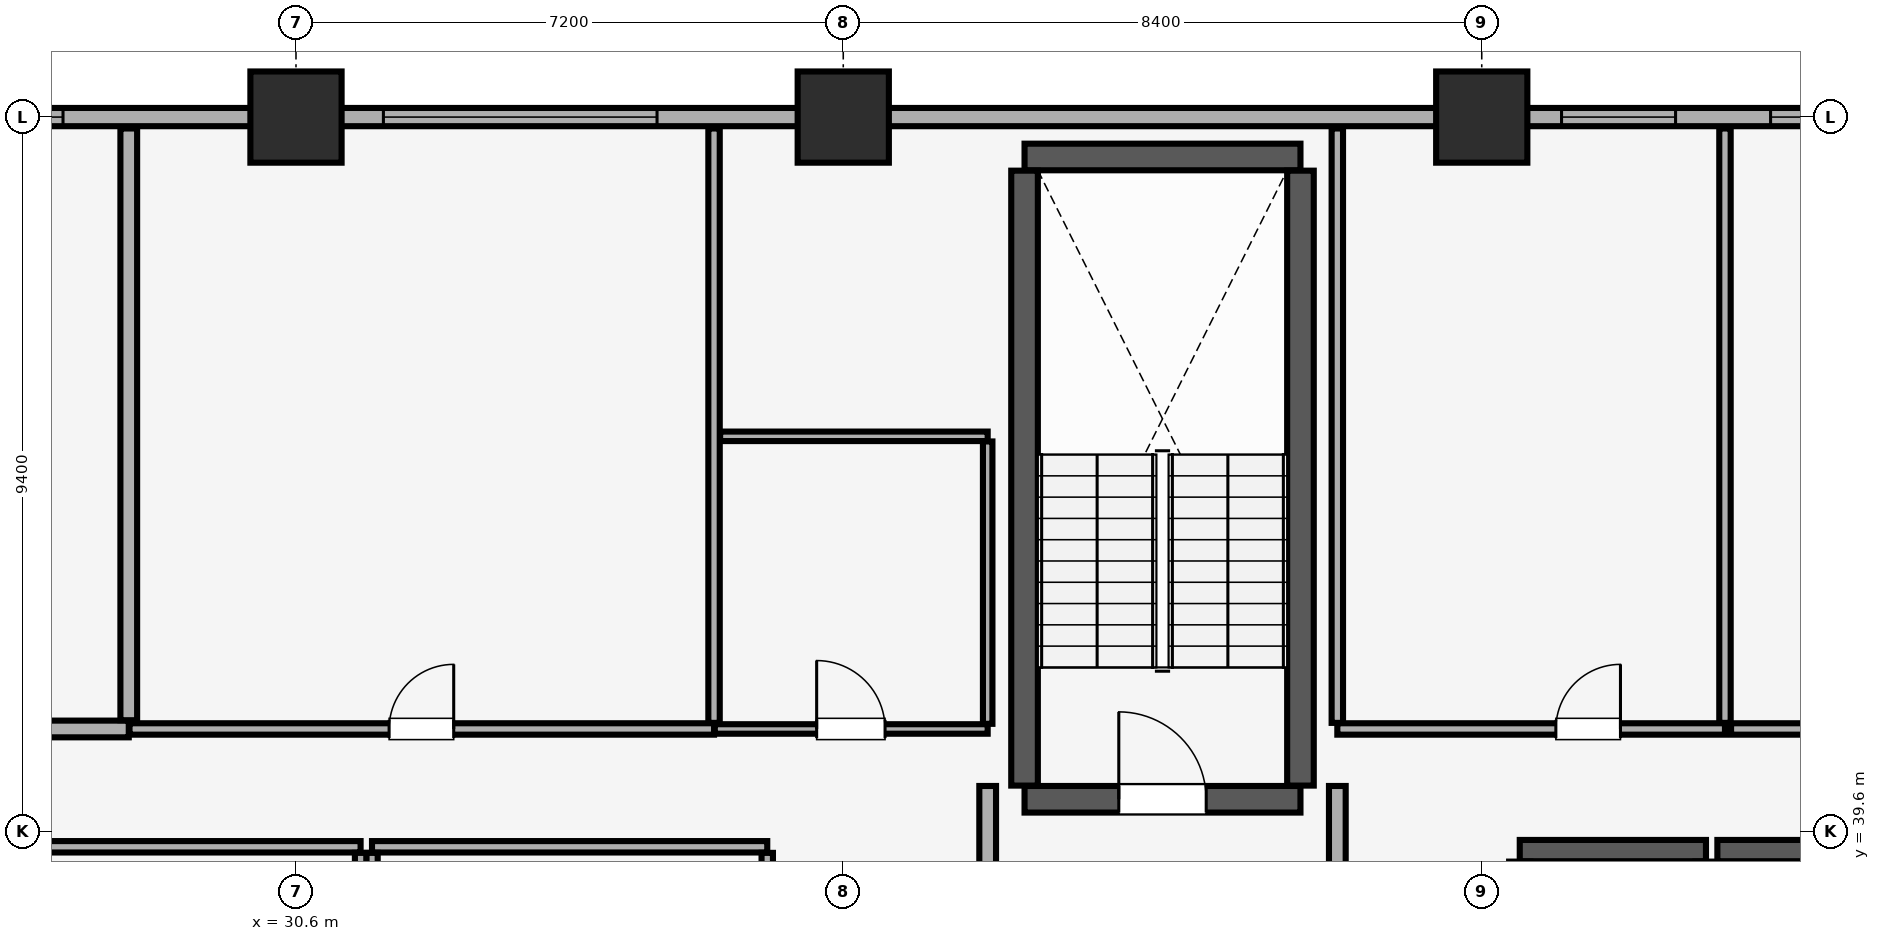
"""IFC4 building model, lengths in metres.
Left out: names, types, materials, properties, quantities, classifications, styles, units other than length and angle.
Written with IfcOpenShell. Run it as: python <this file> out.ifc"""

import sys

from ifc_helpers import new_model, si_unit, direction, frame, frame_2d, origin, origin_2d, place, context, subcontext, project, spatial, rectangle, extrude, element, fill, save


model = new_model("IFC4")
c1 = context("Model", 3, precision=1e-05, world=origin(), true_north=direction((0.0, 1.0)))
c2 = subcontext(c1, "Body", "Model", "MODEL_VIEW")
j1 = project(units=[si_unit("LENGTHUNIT", "METRE"), si_unit("PLANEANGLEUNIT", "RADIAN")], contexts=[c1])
p1 = place(None, origin())
s1 = spatial("IfcSite", under=j1, at=p1, CompositionType="ELEMENT")
p2 = place(p1, origin())
s2 = spatial("IfcBuilding", under=s1, at=p2, CompositionType="ELEMENT")
p3 = place(p2, frame((0.0, 0.0, 220.55)))
s3 = spatial("IfcBuildingStorey", under=s2, at=p3, CompositionType="ELEMENT", Elevation=220.55)
for number, where, z_axis, x_axis in (
    (1, (30.6, 49.0, 0.0), (0.0, 0.0, 1.0), (1.0, 0.0, 0.0)),
    (2, (37.8, 49.0, 0.0), (0.0, 0.0, 1.0), (1.0, 0.0, 0.0)),
    (3, (46.2, 49.0, 0.0), (0.0, 0.0, 1.0), (1.0, 0.0, 0.0)),
):
    element("IfcColumn", number, at=place(p3, frame(where, z_axis=z_axis, x_axis=x_axis)), inside=s3, PredefinedType="COLUMN", context=c2, shape_type="SweptSolid", body=[
        extrude(rectangle(XDim=1.2, YDim=1.2, at=origin_2d()), origin(), (0.0, 0.0, 1.0), 3.56),
    ])
p4 = place(p3, frame((77.0, 49.0, 0.0), z_axis=(0.0, 0.0, 1.0), x_axis=(-1.0, 0.0, 0.0)))
e4 = element("IfcWall", 4, at=p4, inside=s3, PredefinedType="SOLIDWALL", context=c2, shape_type="SweptSolid", body=[
    extrude(rectangle(XDim=70.0, YDim=0.24, at=frame_2d((35.0, 0.0))), origin(), (0.0, 0.0, 1.0), 2.76),
])
p5 = place(p4, frame((63.7, 0.0, 0.85)))
e5 = element("IfcOpeningElement", 5, at=p5, cuts=e4, PredefinedType="OPENING", context=c2, shape_type="SweptSolid", body=[
    extrude(rectangle(XDim=3.0, YDim=1.5, at=frame_2d((1.5, 0.75))), frame((0.0, 0.13, 0.0), z_axis=(0.0, -1.0, 0.0), x_axis=(1.0, 0.0, 0.0)), (0.0, 0.0, 1.0), 0.26),
])
p6 = place(p4, frame((3.3, 0.0, 0.85)))
e6 = element("IfcOpeningElement", 6, at=p6, cuts=e4, PredefinedType="OPENING", context=c2, shape_type="SweptSolid", body=[
    extrude(rectangle(XDim=3.0, YDim=1.5, at=frame_2d((1.5, 0.75))), frame((0.0, 0.13, 0.0), z_axis=(0.0, -1.0, 0.0), x_axis=(1.0, 0.0, 0.0)), (0.0, 0.0, 1.0), 0.26),
])
p7 = place(p4, frame((49.465, 0.0, 0.9)))
e7 = element("IfcOpeningElement", 7, at=p7, cuts=e4, PredefinedType="OPENING", context=c2, shape_type="SweptSolid", body=[
    extrude(rectangle(XDim=1.5, YDim=1.4, at=frame_2d((0.75, 0.7))), frame((0.0, 0.13, 0.0), z_axis=(0.0, -1.0, 0.0), x_axis=(1.0, 0.0, 0.0)), (0.0, 0.0, 1.0), 0.26),
])
p8 = place(p4, frame((41.65, 0.0, 0.9)))
e8 = element("IfcOpeningElement", 8, at=p8, cuts=e4, PredefinedType="OPENING", context=c2, shape_type="SweptSolid", body=[
    extrude(rectangle(XDim=3.6, YDim=1.5, at=frame_2d((1.8, 0.75))), frame((0.0, 0.13, 0.0), z_axis=(0.0, -1.0, 0.0), x_axis=(1.0, 0.0, 0.0)), (0.0, 0.0, 1.0), 0.26),
])
p9 = place(p4, frame((28.25, 0.0, 0.9)))
e9 = element("IfcOpeningElement", 9, at=p9, cuts=e4, PredefinedType="OPENING", context=c2, shape_type="SweptSolid", body=[
    extrude(rectangle(XDim=1.5, YDim=1.4, at=frame_2d((0.75, 0.7))), frame((0.0, 0.13, 0.0), z_axis=(0.0, -1.0, 0.0), x_axis=(1.0, 0.0, 0.0)), (0.0, 0.0, 1.0), 0.26),
])
p10 = place(p4, frame((24.6, 0.0, 0.9)))
e10 = element("IfcOpeningElement", 10, at=p10, cuts=e4, PredefinedType="OPENING", context=c2, shape_type="SweptSolid", body=[
    extrude(rectangle(XDim=2.4, YDim=1.5, at=frame_2d((1.2, 0.75))), frame((0.0, 0.13, 0.0), z_axis=(0.0, -1.0, 0.0), x_axis=(1.0, 0.0, 0.0)), (0.0, 0.0, 1.0), 0.26),
])
p11 = place(p4, frame((20.235, 0.0, 0.9)))
e11 = element("IfcOpeningElement", 11, at=p11, cuts=e4, PredefinedType="OPENING", context=c2, shape_type="SweptSolid", body=[
    extrude(rectangle(XDim=2.4, YDim=1.5, at=frame_2d((1.2, 0.75))), frame((0.0, 0.13, 0.0), z_axis=(0.0, -1.0, 0.0), x_axis=(1.0, 0.0, 0.0)), (0.0, 0.0, 1.0), 0.26),
])
p12 = place(p3, frame((40.185, 40.025, 0.0), z_axis=(0.0, 0.0, 1.0), x_axis=(1.0, 0.0, 0.0)))
e12 = element("IfcWall", 12, at=p12, inside=s3, PredefinedType="SHEAR", context=c2, shape_type="SweptSolid", body=[
    extrude(rectangle(XDim=3.63, YDim=0.35, at=frame_2d((1.815, 0.0))), origin(), (0.0, 0.0, 1.0), 3.56),
])
p13 = place(p12, frame((1.24, 0.0, 0.0)))
e13 = element("IfcOpeningElement", 13, at=p13, cuts=e12, PredefinedType="OPENING", context=c2, shape_type="SweptSolid", body=[
    extrude(rectangle(XDim=1.15, YDim=2.15, at=frame_2d((0.575, 1.075))), frame((0.0, 0.185, 0.0), z_axis=(0.0, -1.0, 0.0), x_axis=(1.0, 0.0, 0.0)), (0.0, 0.0, 1.0), 0.37),
])
p14 = place(p3, frame((40.185, 48.475, 0.0), z_axis=(0.0, 0.0, 1.0), x_axis=(1.0, 0.0, 0.0)))
e14 = element("IfcWall", 14, at=p14, inside=s3, PredefinedType="SHEAR", context=c2, shape_type="SweptSolid", body=[
    extrude(rectangle(XDim=3.63, YDim=0.35, at=frame_2d((1.815, 0.0))), origin(), (0.0, 0.0, 1.0), 3.56),
])
for number, where, z_axis, x_axis in (
    (15, (40.185, 40.205, 0.0), (0.0, 0.0, 1.0), (0.0, 1.0, 0.0)),
    (16, (43.815, 40.205, 0.0), (0.0, 0.0, 1.0), (0.0, 1.0, 0.0)),
):
    element("IfcWall", number, at=place(p3, frame(where, z_axis=z_axis, x_axis=x_axis)), inside=s3, PredefinedType="SHEAR", context=c2, shape_type="SweptSolid", body=[
        extrude(rectangle(XDim=8.09, YDim=0.35, at=frame_2d((4.045, 0.0))), origin(), (0.0, 0.0, 1.0), 3.56),
    ])
p15 = place(p3, frame((46.7, 39.35, 0.0), z_axis=(0.0, 0.0, 1.0), x_axis=(1.0, 0.0, 0.0)))
e17 = element("IfcWall", 17, at=p15, inside=s3, PredefinedType="SHEAR", context=c2, shape_type="SweptSolid", body=[
    extrude(rectangle(XDim=2.45, YDim=0.28, at=frame_2d((1.225, 0.0))), origin(), (0.0, 0.0, 1.0), 3.56),
])
for number, where, z_axis, x_axis in (
    (18, (46.7, 37.145, 0.0), (0.0, 0.0, 1.0), (0.0, 1.0, 0.0)),
    (19, (49.15, 37.145, 0.0), (0.0, 0.0, 1.0), (0.0, 1.0, 0.0)),
):
    element("IfcWall", number, at=place(p3, frame(where, z_axis=z_axis, x_axis=x_axis)), inside=s3, PredefinedType="SHEAR", context=c2, shape_type="SweptSolid", body=[
        extrude(rectangle(XDim=2.06, YDim=0.28, at=frame_2d((1.03, 0.0))), origin(), (0.0, 0.0, 1.0), 3.56),
    ])
p16 = place(p3, frame((49.3, 39.35, 0.0), z_axis=(0.0, 0.0, 1.0), x_axis=(1.0, 0.0, 0.0)))
e20 = element("IfcWall", 20, at=p16, inside=s3, PredefinedType="SHEAR", context=c2, shape_type="SweptSolid", body=[
    extrude(rectangle(XDim=2.45, YDim=0.28, at=frame_2d((1.225, 0.0))), origin(), (0.0, 0.0, 1.0), 3.56),
])
for number, where, z_axis, x_axis in (
    (21, (39.7, 34.415, 0.0), (0.0, 0.0, 1.0), (0.0, 1.0, 0.0)),
    (22, (44.3, 34.415, 0.0), (0.0, 0.0, 1.0), (0.0, 1.0, 0.0)),
):
    element("IfcWall", number, at=place(p3, frame(where, z_axis=z_axis, x_axis=x_axis)), inside=s3, PredefinedType="PARTITIONING", context=c2, shape_type="SweptSolid", body=[
        extrude(rectangle(XDim=5.785, YDim=0.22, at=frame_2d((2.893, 0.0))), origin(), (0.0, 0.0, 1.0), 3.56),
    ])
p17 = place(p3, frame((31.6, 39.4, 0.0), z_axis=(0.0, 0.0, 1.0), x_axis=(1.0, 0.0, 0.0)))
e23 = element("IfcWall", 23, at=p17, inside=s3, PredefinedType="PARTITIONING", context=c2, shape_type="SweptSolid", body=[
    extrude(rectangle(XDim=5.2, YDim=0.15, at=frame_2d((2.6, 0.0))), origin(), (0.0, 0.0, 1.0), 3.56),
])
for number, where, z_axis, x_axis in (
    (24, (31.6, 34.38, 0.0), (0.0, 0.0, 1.0), (0.0, 1.0, 0.0)),
    (25, (36.8, 34.38, 0.0), (0.0, 0.0, 1.0), (0.0, 1.0, 0.0)),
):
    element("IfcWall", number, at=place(p3, frame(where, z_axis=z_axis, x_axis=x_axis)), inside=s3, PredefinedType="PARTITIONING", context=c2, shape_type="SweptSolid", body=[
        extrude(rectangle(XDim=4.94, YDim=0.15, at=frame_2d((2.47, 0.0))), origin(), (0.0, 0.0, 1.0), 3.56),
    ])
p18 = place(p3, frame((23.8, 39.4, 0.0), z_axis=(0.0, 0.0, 1.0), x_axis=(1.0, 0.0, 0.0)))
e26 = element("IfcWall", 26, at=p18, inside=s3, PredefinedType="PARTITIONING", context=c2, shape_type="SweptSolid", body=[
    extrude(rectangle(XDim=7.65, YDim=0.15, at=frame_2d((3.825, 0.0))), origin(), (0.0, 0.0, 1.0), 3.56),
])
p19 = place(p3, frame((31.45, 34.38, 0.0), z_axis=(0.0, 0.0, 1.0), x_axis=(0.0, 1.0, 0.0)))
e27 = element("IfcWall", 27, at=p19, inside=s3, PredefinedType="PARTITIONING", context=c2, shape_type="SweptSolid", body=[
    extrude(rectangle(XDim=4.94, YDim=0.15, at=frame_2d((2.47, 0.0))), origin(), (0.0, 0.0, 1.0), 3.56),
])
p20 = place(p3, frame((25.0, 40.95, 0.0), z_axis=(0.0, 0.0, 1.0), x_axis=(1.0, 0.0, 0.0)))
e28 = element("IfcWall", 28, at=p20, inside=s3, PredefinedType="PARTITIONING", context=c2, shape_type="SweptSolid", body=[
    extrude(rectangle(XDim=3.4, YDim=0.22, at=frame_2d((1.7, 0.0))), origin(), (0.0, 0.0, 1.0), 3.56),
])
p21 = place(p20, frame((1.275, 0.0, 0.0)))
e29 = element("IfcOpeningElement", 29, at=p21, cuts=e28, PredefinedType="OPENING", context=c2, shape_type="SweptSolid", body=[
    extrude(rectangle(XDim=0.85, YDim=2.1, at=frame_2d((0.425, 1.05))), frame((0.0, 0.12, 0.0), z_axis=(0.0, -1.0, 0.0), x_axis=(1.0, 0.0, 0.0)), (0.0, 0.0, 1.0), 0.24),
])
p22 = place(p3, frame((28.4, 41.065, 0.0), z_axis=(0.0, 0.0, 1.0), x_axis=(0.0, 1.0, 0.0)))
e30 = element("IfcWall", 30, at=p22, inside=s3, PredefinedType="PARTITIONING", context=c2, shape_type="SweptSolid", body=[
    extrude(rectangle(XDim=7.785, YDim=0.22, at=frame_2d((3.893, 0.0))), origin(), (0.0, 0.0, 1.0), 3.56),
])
p23 = place(p3, frame((28.41, 40.95, 0.0), z_axis=(0.0, 0.0, 1.0), x_axis=(1.0, 0.0, 0.0)))
e31 = element("IfcWall", 31, at=p23, inside=s3, PredefinedType="PARTITIONING", context=c2, shape_type="SweptSolid", body=[
    extrude(rectangle(XDim=7.69, YDim=0.15, at=frame_2d((3.845, 0.0))), origin(), (0.0, 0.0, 1.0), 3.56),
])
p24 = place(p23, frame((3.415, 0.0, 0.0)))
e32 = element("IfcOpeningElement", 32, at=p24, cuts=e31, PredefinedType="OPENING", context=c2, shape_type="SweptSolid", body=[
    extrude(rectangle(XDim=0.85, YDim=2.1, at=frame_2d((0.425, 1.05))), frame((0.0, 0.085, 0.0), z_axis=(0.0, -1.0, 0.0), x_axis=(1.0, 0.0, 0.0)), (0.0, 0.0, 1.0), 0.17),
])
p25 = place(p3, frame((36.1, 41.03, 0.0), z_axis=(0.0, 0.0, 1.0), x_axis=(0.0, 1.0, 0.0)))
e33 = element("IfcWall", 33, at=p25, inside=s3, PredefinedType="PARTITIONING", context=c2, shape_type="SweptSolid", body=[
    extrude(rectangle(XDim=7.82, YDim=0.15, at=frame_2d((3.91, 0.0))), origin(), (0.0, 0.0, 1.0), 3.56),
])
p26 = place(p3, frame((36.11, 40.95, 0.0), z_axis=(0.0, 0.0, 1.0), x_axis=(1.0, 0.0, 0.0)))
e34 = element("IfcWall", 34, at=p26, inside=s3, PredefinedType="PARTITIONING", context=c2, shape_type="SweptSolid", body=[
    extrude(rectangle(XDim=3.59, YDim=0.125, at=frame_2d((1.795, 0.0))), origin(), (0.0, 0.0, 1.0), 3.56),
])
p27 = place(p26, frame((1.34, 0.0, 0.0)))
e35 = element("IfcOpeningElement", 35, at=p27, cuts=e34, PredefinedType="OPENING", context=c2, shape_type="SweptSolid", body=[
    extrude(rectangle(XDim=0.9, YDim=2.1, at=frame_2d((0.45, 1.05))), frame((0.0, 0.073, 0.0), z_axis=(0.0, -1.0, 0.0), x_axis=(1.0, 0.0, 0.0)), (0.0, 0.0, 1.0), 0.145),
])
p28 = place(p3, frame((36.18, 44.8, 0.0), z_axis=(0.0, 0.0, 1.0), x_axis=(1.0, 0.0, 0.0)))
e36 = element("IfcWall", 36, at=p28, inside=s3, PredefinedType="PARTITIONING", context=c2, shape_type="SweptSolid", body=[
    extrude(rectangle(XDim=3.52, YDim=0.125, at=frame_2d((1.76, 0.0))), origin(), (0.0, 0.0, 1.0), 3.56),
])
p29 = place(p3, frame((39.7, 41.018, 0.0), z_axis=(0.0, 0.0, 1.0), x_axis=(0.0, 1.0, 0.0)))
e37 = element("IfcWall", 37, at=p29, inside=s3, PredefinedType="PARTITIONING", context=c2, shape_type="SweptSolid", body=[
    extrude(rectangle(XDim=3.715, YDim=0.125, at=frame_2d((1.857, 0.0))), origin(), (0.0, 0.0, 1.0), 3.56),
])
p30 = place(p3, frame((44.3, 40.95, 0.0), z_axis=(0.0, 0.0, 1.0), x_axis=(1.0, 0.0, 0.0)))
e38 = element("IfcWall", 38, at=p30, inside=s3, PredefinedType="PARTITIONING", context=c2, shape_type="SweptSolid", body=[
    extrude(rectangle(XDim=5.1, YDim=0.15, at=frame_2d((2.55, 0.0))), origin(), (0.0, 0.0, 1.0), 3.56),
])
p31 = place(p30, frame((2.875, 0.0, 0.0)))
e39 = element("IfcOpeningElement", 39, at=p31, cuts=e38, PredefinedType="OPENING", context=c2, shape_type="SweptSolid", body=[
    extrude(rectangle(XDim=0.85, YDim=2.1, at=frame_2d((0.425, 1.05))), frame((0.0, 0.085, 0.0), z_axis=(0.0, -1.0, 0.0), x_axis=(1.0, 0.0, 0.0)), (0.0, 0.0, 1.0), 0.17),
])
for number, where, z_axis, x_axis in (
    (40, (44.3, 41.03, 0.0), (0.0, 0.0, 1.0), (0.0, 1.0, 0.0)),
    (41, (49.4, 41.03, 0.0), (0.0, 0.0, 1.0), (0.0, 1.0, 0.0)),
):
    element("IfcWall", number, at=place(p3, frame(where, z_axis=z_axis, x_axis=x_axis)), inside=s3, PredefinedType="PARTITIONING", context=c2, shape_type="SweptSolid", body=[
        extrude(rectangle(XDim=7.82, YDim=0.15, at=frame_2d((3.91, 0.0))), origin(), (0.0, 0.0, 1.0), 3.56),
    ])
p32 = place(p3, frame((49.48, 40.95, 0.0), z_axis=(0.0, 0.0, 1.0), x_axis=(1.0, 0.0, 0.0)))
e42 = element("IfcWall", 42, at=p32, inside=s3, PredefinedType="PARTITIONING", context=c2, shape_type="SweptSolid", body=[
    extrude(rectangle(XDim=8.02, YDim=0.15, at=frame_2d((4.01, 0.0))), origin(), (0.0, 0.0, 1.0), 3.56),
])
p33 = place(p32, frame((4.72, 0.0, 0.0)))
e43 = element("IfcOpeningElement", 43, at=p33, cuts=e42, PredefinedType="OPENING", context=c2, shape_type="SweptSolid", body=[
    extrude(rectangle(XDim=1.0, YDim=2.15, at=frame_2d((0.5, 1.075))), frame((0.0, 0.085, 0.0), z_axis=(0.0, -1.0, 0.0), x_axis=(1.0, 0.0, 0.0)), (0.0, 0.0, 1.0), 0.17),
])
p34 = place(p7, origin())
e44 = element("IfcWindow", 44, at=p34, inside=s3, PartitioningType="SINGLE_PANEL", PredefinedType="WINDOW", context=c2, shape_type="SweptSolid", body=[
    extrude(rectangle(XDim=1.5, YDim=1.4, at=frame_2d((0.75, 0.7))), frame((0.0, 0.03, 0.0), z_axis=(0.0, -1.0, 0.0), x_axis=(1.0, 0.0, 0.0)), (0.0, 0.0, 1.0), 0.06),
])
fill(e7, e44)
p35 = place(p8, origin())
e45 = element("IfcWindow", 45, at=p35, inside=s3, PartitioningType="SINGLE_PANEL", PredefinedType="WINDOW", context=c2, shape_type="SweptSolid", body=[
    extrude(rectangle(XDim=3.6, YDim=1.5, at=frame_2d((1.8, 0.75))), frame((0.0, 0.03, 0.0), z_axis=(0.0, -1.0, 0.0), x_axis=(1.0, 0.0, 0.0)), (0.0, 0.0, 1.0), 0.06),
])
fill(e8, e45)
p36 = place(p9, origin())
e46 = element("IfcWindow", 46, at=p36, inside=s3, PartitioningType="SINGLE_PANEL", PredefinedType="WINDOW", context=c2, shape_type="SweptSolid", body=[
    extrude(rectangle(XDim=1.5, YDim=1.4, at=frame_2d((0.75, 0.7))), frame((0.0, 0.03, 0.0), z_axis=(0.0, -1.0, 0.0), x_axis=(1.0, 0.0, 0.0)), (0.0, 0.0, 1.0), 0.06),
])
fill(e9, e46)
p37 = place(p10, origin())
e47 = element("IfcWindow", 47, at=p37, inside=s3, PartitioningType="SINGLE_PANEL", PredefinedType="WINDOW", context=c2, shape_type="SweptSolid", body=[
    extrude(rectangle(XDim=2.4, YDim=1.5, at=frame_2d((1.2, 0.75))), frame((0.0, 0.03, 0.0), z_axis=(0.0, -1.0, 0.0), x_axis=(1.0, 0.0, 0.0)), (0.0, 0.0, 1.0), 0.06),
])
fill(e10, e47)
p38 = place(p13, origin())
e48 = element("IfcDoor", 48, at=p38, inside=s3, OperationType="SINGLE_SWING_LEFT", PredefinedType="DOOR", context=c2, shape_type="SweptSolid", body=[
    extrude(rectangle(XDim=1.15, YDim=2.15, at=frame_2d((0.575, 1.075))), frame((0.0, 0.025, 0.0), z_axis=(0.0, -1.0, 0.0), x_axis=(1.0, 0.0, 0.0)), (0.0, 0.0, 1.0), 0.05),
])
fill(e13, e48)
p39 = place(p24, origin())
e49 = element("IfcDoor", 49, at=p39, inside=s3, OperationType="SINGLE_SWING_RIGHT", PredefinedType="DOOR", context=c2, shape_type="SweptSolid", body=[
    extrude(rectangle(XDim=0.85, YDim=2.1, at=frame_2d((0.425, 1.05))), frame((0.0, 0.025, 0.0), z_axis=(0.0, -1.0, 0.0), x_axis=(1.0, 0.0, 0.0)), (0.0, 0.0, 1.0), 0.05),
])
fill(e32, e49)
p40 = place(p27, origin())
e50 = element("IfcDoor", 50, at=p40, inside=s3, OperationType="SINGLE_SWING_LEFT", PredefinedType="DOOR", context=c2, shape_type="SweptSolid", body=[
    extrude(rectangle(XDim=0.9, YDim=2.1, at=frame_2d((0.45, 1.05))), frame((0.0, 0.025, 0.0), z_axis=(0.0, -1.0, 0.0), x_axis=(1.0, 0.0, 0.0)), (0.0, 0.0, 1.0), 0.05),
])
fill(e35, e50)
p41 = place(p31, origin())
e51 = element("IfcDoor", 51, at=p41, inside=s3, OperationType="SINGLE_SWING_RIGHT", PredefinedType="DOOR", context=c2, shape_type="SweptSolid", body=[
    extrude(rectangle(XDim=0.85, YDim=2.1, at=frame_2d((0.425, 1.05))), frame((0.0, 0.025, 0.0), z_axis=(0.0, -1.0, 0.0), x_axis=(1.0, 0.0, 0.0)), (0.0, 0.0, 1.0), 0.05),
])
fill(e39, e51)
save(model, sys.argv[1])
